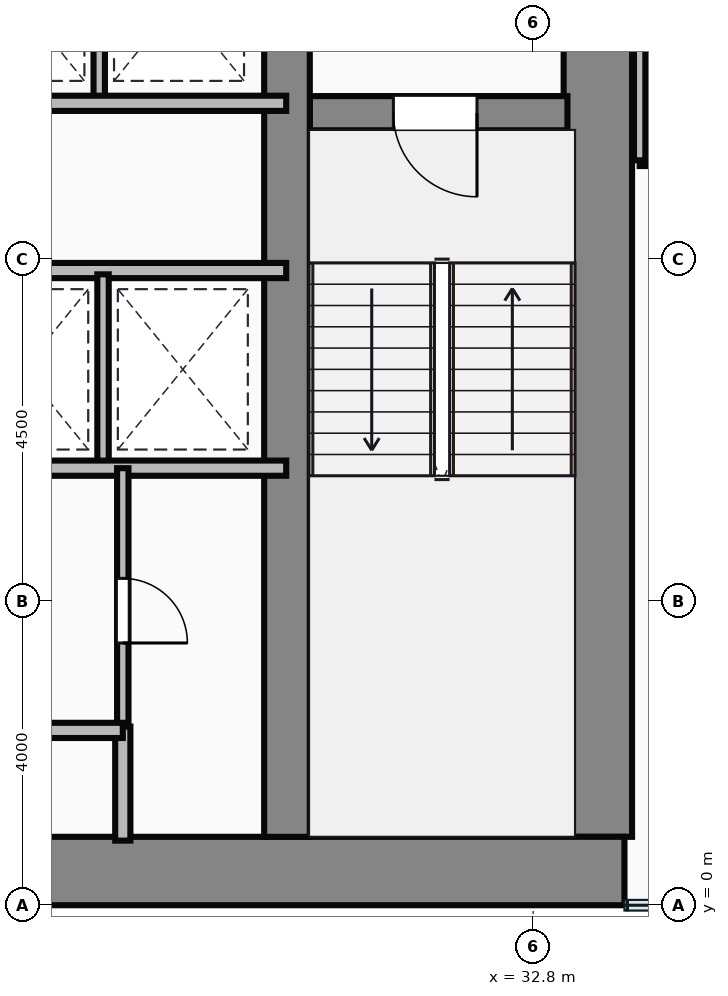
"""IFC4 building model, lengths in metres.
Left out: names, types, materials, properties, quantities, classifications, styles, units other than length and angle.
Written with IfcOpenShell. Run it as: python <this file> out.ifc"""

import sys

from ifc_helpers import new_model, si_unit, direction, frame, frame_2d, origin, place, context, subcontext, project, spatial, rectangle, extrude, source, transform, mapped, element, fill, save


model = new_model("IFC4")
c1 = context("Model", 3, precision=1e-05, world=origin(), true_north=direction((0.0, 1.0)))
c2 = subcontext(c1, "Body", "Model", "MODEL_VIEW")
j1 = project(units=[si_unit("LENGTHUNIT", "METRE"), si_unit("PLANEANGLEUNIT", "RADIAN")], contexts=[c1])
p1 = place(None, origin())
s1 = spatial("IfcSite", under=j1, at=p1, CompositionType="ELEMENT")
p2 = place(p1, origin())
s2 = spatial("IfcBuilding", under=s1, at=p2, CompositionType="ELEMENT")
p3 = place(p2, frame((0.0, 0.0, 36.15)))
s3 = spatial("IfcBuildingStorey", under=s2, at=p3, CompositionType="ELEMENT", Elevation=36.15)
m1 = source(origin(), c2, "Body", "SweptSolid", [
    extrude(rectangle(XDim=29.5, YDim=0.9, at=frame_2d((14.75, 0.0))), origin(), (0.0, 0.0, 1.0), 3.65),
])
p4 = place(p3, frame((4.5, 0.45, 0.0), z_axis=(0.0, 0.0, 1.0), x_axis=(1.0, 0.0, 0.0)))
e1 = element("IfcWall", 1, at=p4, inside=s3, PredefinedType="SHEAR", context=c2, shape_type="MappedRepresentation", body=[
    mapped(m1, transform((0.0, 0.0, 0.0))),
])
m2 = source(origin(), c2, "Body", "SweptSolid", [
    extrude(rectangle(XDim=13.1, YDim=0.9, at=frame_2d((6.55, 0.0))), origin(), (0.0, 0.0, 1.0), 3.65),
])
p5 = place(p3, frame((33.65, 0.9, 0.0), z_axis=(0.0, 0.0, 1.0), x_axis=(0.0, 1.0, 0.0)))
e2 = element("IfcWall", 2, at=p5, inside=s3, PredefinedType="SHEAR", context=c2, shape_type="MappedRepresentation", body=[
    mapped(m2, transform((0.0, 0.0, 0.0))),
])
m3 = source(origin(), c2, "Body", "SweptSolid", [
    extrude(rectangle(XDim=12.2, YDim=0.6, at=frame_2d((6.1, 0.0))), origin(), (0.0, 0.0, 1.0), 3.65),
])
p6 = place(p3, frame((29.56, 0.9, 0.0), z_axis=(0.0, 0.0, 1.0), x_axis=(0.0, 1.0, 0.0)))
e3 = element("IfcWall", 3, at=p6, inside=s3, PredefinedType="SHEAR", context=c2, shape_type="MappedRepresentation", body=[
    mapped(m3, transform((0.0, 0.0, 0.0))),
])
m4 = source(origin(), c2, "Body", "SweptSolid", [
    extrude(rectangle(XDim=3.39, YDim=0.45, at=frame_2d((1.695, 0.0))), origin(), (0.0, 0.0, 1.0), 3.65),
])
p7 = place(p3, frame((29.86, 10.42, 0.0), z_axis=(0.0, 0.0, 1.0), x_axis=(1.0, 0.0, 0.0)))
e4 = element("IfcWall", 4, at=p7, inside=s3, PredefinedType="SHEAR", context=c2, shape_type="MappedRepresentation", body=[
    mapped(m4, transform((0.0, 0.0, 0.0))),
])
p8 = place(p7, frame((1.1, 0.0, 0.0)))
e5 = element("IfcOpeningElement", 5, at=p8, cuts=e4, PredefinedType="OPENING", context=c2, shape_type="SweptSolid", body=[
    extrude(rectangle(XDim=1.1, YDim=2.15, at=frame_2d((0.55, 1.075))), frame((0.0, 0.235, 0.0), z_axis=(0.0, -1.0, 0.0), x_axis=(1.0, 0.0, 0.0)), (0.0, 0.0, 1.0), 0.47),
])
m5 = source(origin(), c2, "Body", "SweptSolid", [
    extrude(rectangle(XDim=8.8, YDim=0.2, at=frame_2d((4.4, 0.0))), origin(), (0.0, 0.0, 1.0), 3.4),
])
p9 = place(p3, frame((20.75, 10.55, 0.0), z_axis=(0.0, 0.0, 1.0), x_axis=(1.0, 0.0, 0.0)))
e6 = element("IfcWall", 6, at=p9, inside=s3, PredefinedType="PARTITIONING", context=c2, shape_type="MappedRepresentation", body=[
    mapped(m5, transform((0.0, 0.0, 0.0))),
])
m6 = source(origin(), c2, "Body", "SweptSolid", [
    extrude(rectangle(XDim=2.85, YDim=0.15, at=frame_2d((1.425, 0.0))), origin(), (0.0, 0.0, 1.0), 3.4),
])
p10 = place(p3, frame((27.09, 10.6, 0.0), z_axis=(0.0, 0.0, 1.0), x_axis=(0.0, 1.0, 0.0)))
e7 = element("IfcWall", 7, at=p10, inside=s3, PredefinedType="PARTITIONING", context=c2, shape_type="MappedRepresentation", body=[
    mapped(m6, transform((0.0, 0.0, 0.0))),
])
m7 = source(origin(), c2, "Body", "SweptSolid", [
    extrude(rectangle(XDim=4.55, YDim=0.2, at=frame_2d((2.275, 0.0))), origin(), (0.0, 0.0, 1.0), 3.4),
])
for number, where, z_axis, x_axis in (
    (8, (25.0, 8.35, 0.0), (0.0, 0.0, 1.0), (1.0, 0.0, 0.0)),
    (9, (25.0, 5.75, 0.0), (0.0, 0.0, 1.0), (1.0, 0.0, 0.0)),
):
    element("IfcWall", number, at=place(p3, frame(where, z_axis=z_axis, x_axis=x_axis)), inside=s3, PredefinedType="PARTITIONING", context=c2, shape_type="MappedRepresentation", body=[
        mapped(m7, transform((0.0, 0.0, 0.0))),
    ])
m8 = source(origin(), c2, "Body", "SweptSolid", [
    extrude(rectangle(XDim=2.5, YDim=0.15, at=frame_2d((1.25, 0.0))), origin(), (0.0, 0.0, 1.0), 3.4),
])
p11 = place(p3, frame((27.14, 5.8, 0.0), z_axis=(0.0, 0.0, 1.0), x_axis=(0.0, 1.0, 0.0)))
e10 = element("IfcWall", 10, at=p11, inside=s3, PredefinedType="PARTITIONING", context=c2, shape_type="MappedRepresentation", body=[
    mapped(m8, transform((0.0, 0.0, 0.0))),
])
m9 = source(origin(), c2, "Body", "SweptSolid", [
    extrude(rectangle(XDim=2.4, YDim=0.2, at=frame_2d((1.2, 0.0))), origin(), (0.0, 0.0, 1.0), 3.4),
])
p12 = place(p3, frame((25.0, 2.3, 0.0), z_axis=(0.0, 0.0, 1.0), x_axis=(1.0, 0.0, 0.0)))
e11 = element("IfcWall", 11, at=p12, inside=s3, PredefinedType="PARTITIONING", context=c2, shape_type="MappedRepresentation", body=[
    mapped(m9, transform((0.0, 0.0, 0.0))),
])
m10 = source(origin(), c2, "Body", "SweptSolid", [
    extrude(rectangle(XDim=1.5, YDim=0.2, at=frame_2d((0.75, 0.0))), origin(), (0.0, 0.0, 1.0), 3.4),
])
p13 = place(p3, frame((27.4, 0.85, 0.0), z_axis=(0.0, 0.0, 1.0), x_axis=(0.0, 1.0, 0.0)))
e12 = element("IfcWall", 12, at=p13, inside=s3, PredefinedType="PARTITIONING", context=c2, shape_type="MappedRepresentation", body=[
    mapped(m10, transform((0.0, 0.0, 0.0))),
])
m11 = source(origin(), c2, "Body", "SweptSolid", [
    extrude(rectangle(XDim=3.4, YDim=0.15, at=frame_2d((1.7, 0.0))), origin(), (0.0, 0.0, 1.0), 3.4),
])
p14 = place(p3, frame((27.4, 2.35, 0.0), z_axis=(0.0, 0.0, 1.0), x_axis=(0.0, 1.0, 0.0)))
e13 = element("IfcWall", 13, at=p14, inside=s3, PredefinedType="PARTITIONING", context=c2, shape_type="MappedRepresentation", body=[
    mapped(m11, transform((0.0, 0.0, 0.0))),
])
p15 = place(p14, frame((1.1, 0.0, 0.0)))
e14 = element("IfcOpeningElement", 14, at=p15, cuts=e13, PredefinedType="OPENING", context=c2, shape_type="SweptSolid", body=[
    extrude(rectangle(XDim=0.85, YDim=2.1, at=frame_2d((0.425, 1.05))), frame((0.0, 0.085, 0.0), z_axis=(0.0, -1.0, 0.0), x_axis=(1.0, 0.0, 0.0)), (0.0, 0.0, 1.0), 0.17),
])
m12 = source(origin(), c2, "Body", "SweptSolid", [
    extrude(rectangle(XDim=4.8, YDim=0.15, at=frame_2d((2.4, 0.0))), origin(), (0.0, 0.0, 1.0), 3.4),
])
p16 = place(p3, frame((34.2, 9.8, 0.0), z_axis=(0.0, 0.0, 1.0), x_axis=(1.0, 0.0, 0.0)))
e15 = element("IfcWall", 15, at=p16, inside=s3, PredefinedType="PARTITIONING", context=c2, shape_type="MappedRepresentation", body=[
    mapped(m12, transform((0.0, 0.0, 0.0))),
])
m13 = source(origin(), c2, "Body", "SweptSolid", [
    extrude(rectangle(XDim=4.18, YDim=0.15, at=frame_2d((2.09, 0.0))), origin(), (0.0, 0.0, 1.0), 3.4),
])
p17 = place(p3, frame((34.2, 9.8, 0.0), z_axis=(0.0, 0.0, 1.0), x_axis=(0.0, 1.0, 0.0)))
e16 = element("IfcWall", 16, at=p17, inside=s3, PredefinedType="PARTITIONING", context=c2, shape_type="MappedRepresentation", body=[
    mapped(m13, transform((0.0, 0.0, 0.0))),
])
m14 = source(origin(), c2, "Body", "SweptSolid", [
    extrude(rectangle(XDim=1.1, YDim=2.15, at=frame_2d((0.55, 1.075))), frame((0.0, 0.025, 0.0), z_axis=(0.0, -1.0, 0.0), x_axis=(1.0, 0.0, 0.0)), (0.0, 0.0, 1.0), 0.05),
])
p18 = place(p8, frame((1.1, 0.0, 0.0), z_axis=(0.0, 0.0, 1.0), x_axis=(-1.0, 0.0, 0.0)))
e17 = element("IfcDoor", 17, at=p18, inside=s3, OperationType="SINGLE_SWING_RIGHT", PredefinedType="DOOR", context=c2, shape_type="MappedRepresentation", body=[
    mapped(m14, transform((0.0, 0.0, 0.0))),
])
fill(e5, e17)
m15 = source(origin(), c2, "Body", "SweptSolid", [
    extrude(rectangle(XDim=0.85, YDim=2.1, at=frame_2d((0.425, 1.05))), frame((0.0, 0.025, 0.0), z_axis=(0.0, -1.0, 0.0), x_axis=(1.0, 0.0, 0.0)), (0.0, 0.0, 1.0), 0.05),
])
p19 = place(p15, frame((0.85, 0.0, 0.0), z_axis=(0.0, 0.0, 1.0), x_axis=(-1.0, 0.0, 0.0)))
e18 = element("IfcDoor", 18, at=p19, inside=s3, OperationType="SINGLE_SWING_LEFT", PredefinedType="DOOR", context=c2, shape_type="MappedRepresentation", body=[
    mapped(m15, transform((0.0, 0.0, 0.0))),
])
fill(e14, e18)
save(model, sys.argv[1])
